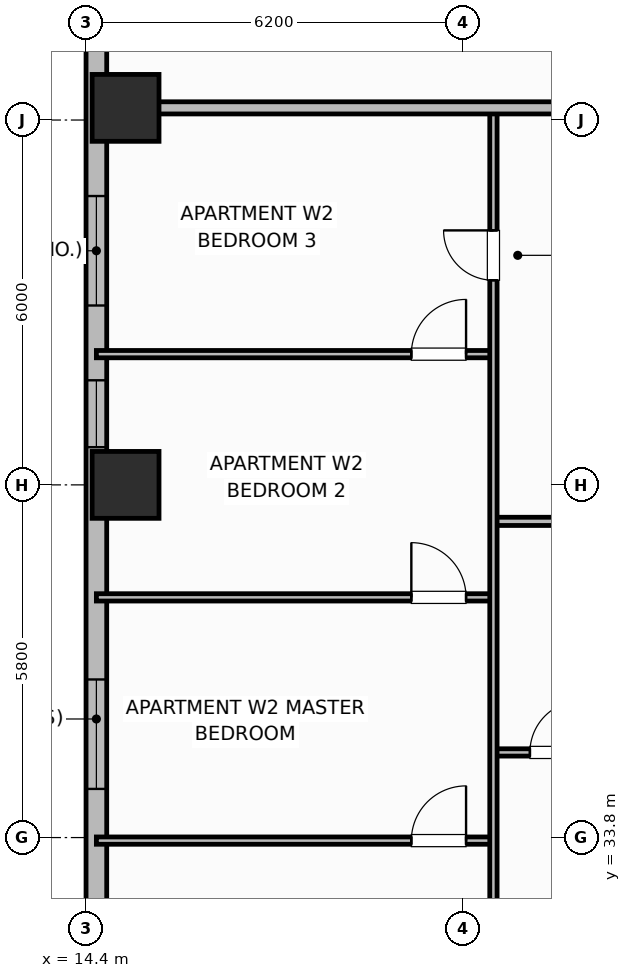
"""IFC4 building model, lengths in metres.
Left out: names, types, materials, properties, quantities, classifications, styles, units other than length and angle.
Written with IfcOpenShell. Run it as: python <this file> out.ifc"""

import sys

from ifc_helpers import new_model, si_unit, direction, frame, frame_2d, origin, origin_2d, place, context, subcontext, project, spatial, rectangle, extrude, element, fill, save


model = new_model("IFC4")
c1 = context("Model", 3, precision=1e-05, world=origin(), true_north=direction((0.0, 1.0)))
c2 = subcontext(c1, "Body", "Model", "MODEL_VIEW")
j1 = project(units=[si_unit("LENGTHUNIT", "METRE"), si_unit("PLANEANGLEUNIT", "RADIAN")], contexts=[c1])
p1 = place(None, origin())
s1 = spatial("IfcSite", under=j1, at=p1, CompositionType="ELEMENT")
p2 = place(p1, origin())
s2 = spatial("IfcBuilding", under=s1, at=p2, CompositionType="ELEMENT")
p3 = place(p2, frame((0.0, 0.0, 88.3)))
s3 = spatial("IfcBuildingStorey", under=s2, at=p3, CompositionType="ELEMENT", Elevation=88.3)
for number, where, z_axis, x_axis in (
    (1, (15.05, 39.6, 0.0), (0.0, 0.0, 1.0), (1.0, 0.0, 0.0)),
    (2, (15.05, 45.8, 0.0), (0.0, 0.0, 1.0), (1.0, 0.0, 0.0)),
):
    element("IfcColumn", number, at=place(p3, frame(where, z_axis=z_axis, x_axis=x_axis)), inside=s3, PredefinedType="COLUMN", context=c2, shape_type="SweptSolid", body=[
        extrude(rectangle(XDim=1.1, YDim=1.1, at=origin_2d()), origin(), (0.0, 0.0, 1.0), 3.7),
    ])
p4 = place(p3, frame((14.57, 47.4, 0.0), z_axis=(0.0, 0.0, 1.0), x_axis=(0.0, -1.0, 0.0)))
e3 = element("IfcWall", 3, at=p4, inside=s3, PredefinedType="SOLIDWALL", context=c2, shape_type="SweptSolid", body=[
    extrude(rectangle(XDim=14.8, YDim=0.34, at=frame_2d((7.4, 0.0))), origin(), (0.0, 0.0, 1.0), 2.7),
])
p5 = place(p4, frame((3.05, 0.0, 0.73)))
e4 = element("IfcOpeningElement", 4, at=p5, cuts=e3, PredefinedType="OPENING", context=c2, shape_type="SweptSolid", body=[
    extrude(rectangle(XDim=1.8, YDim=1.85, at=frame_2d((0.9, 0.925))), frame((0.0, 0.18, 0.0), z_axis=(0.0, -1.0, 0.0), x_axis=(1.0, 0.0, 0.0)), (0.0, 0.0, 1.0), 0.36),
])
p6 = place(p4, frame((6.08, 0.0, 0.89)))
e5 = element("IfcOpeningElement", 5, at=p6, cuts=e3, PredefinedType="OPENING", context=c2, shape_type="SweptSolid", body=[
    extrude(rectangle(XDim=1.1, YDim=1.65, at=frame_2d((0.55, 0.825))), frame((0.0, 0.18, 0.0), z_axis=(0.0, -1.0, 0.0), x_axis=(1.0, 0.0, 0.0)), (0.0, 0.0, 1.0), 0.36),
])
p7 = place(p4, frame((11.0, 0.0, 0.73)))
e6 = element("IfcOpeningElement", 6, at=p7, cuts=e3, PredefinedType="OPENING", context=c2, shape_type="SweptSolid", body=[
    extrude(rectangle(XDim=1.8, YDim=1.85, at=frame_2d((0.9, 0.925))), frame((0.0, 0.18, 0.0), z_axis=(0.0, -1.0, 0.0), x_axis=(1.0, 0.0, 0.0)), (0.0, 0.0, 1.0), 0.36),
])
p8 = place(p3, frame((21.1, 35.2, 0.0), z_axis=(0.0, 0.0, 1.0), x_axis=(1.0, 0.0, 0.0)))
e7 = element("IfcWall", 7, at=p8, inside=s3, PredefinedType="PARTITIONING", context=c2, shape_type="SweptSolid", body=[
    extrude(rectangle(XDim=2.25, YDim=0.12, at=frame_2d((1.125, 0.0))), origin(), (0.0, 0.0, 1.0), 2.53),
])
p9 = place(p8, frame((0.6, 0.0, 0.0)))
e8 = element("IfcOpeningElement", 8, at=p9, cuts=e7, PredefinedType="OPENING", context=c2, shape_type="SweptSolid", body=[
    extrude(rectangle(XDim=0.85, YDim=2.1, at=frame_2d((0.425, 1.05))), frame((0.0, 0.07, 0.0), z_axis=(0.0, -1.0, 0.0), x_axis=(1.0, 0.0, 0.0)), (0.0, 0.0, 1.0), 0.14),
])
p10 = place(p3, frame((21.1, 39.0, 0.0), z_axis=(0.0, 0.0, 1.0), x_axis=(1.0, 0.0, 0.0)))
e9 = element("IfcWall", 9, at=p10, inside=s3, PredefinedType="PARTITIONING", context=c2, shape_type="SweptSolid", body=[
    extrude(rectangle(XDim=2.25, YDim=0.135, at=frame_2d((1.125, 0.0))), origin(), (0.0, 0.0, 1.0), 2.53),
])
p11 = place(p3, frame((14.57, 33.75, 0.0), z_axis=(0.0, 0.0, 1.0), x_axis=(1.0, 0.0, 0.0)))
e10 = element("IfcWall", 10, at=p11, inside=s3, PredefinedType="PARTITIONING", context=c2, shape_type="SweptSolid", body=[
    extrude(rectangle(XDim=6.53, YDim=0.12, at=frame_2d((3.265, 0.0))), origin(), (0.0, 0.0, 1.0), 2.53),
])
p12 = place(p11, frame((5.18, 0.0, 0.0)))
e11 = element("IfcOpeningElement", 11, at=p12, cuts=e10, PredefinedType="OPENING", context=c2, shape_type="SweptSolid", body=[
    extrude(rectangle(XDim=0.9, YDim=2.1, at=frame_2d((0.45, 1.05))), frame((0.0, 0.07, 0.0), z_axis=(0.0, -1.0, 0.0), x_axis=(1.0, 0.0, 0.0)), (0.0, 0.0, 1.0), 0.14),
])
p13 = place(p3, frame((14.57, 37.75, 0.0), z_axis=(0.0, 0.0, 1.0), x_axis=(1.0, 0.0, 0.0)))
e12 = element("IfcWall", 12, at=p13, inside=s3, PredefinedType="PARTITIONING", context=c2, shape_type="SweptSolid", body=[
    extrude(rectangle(XDim=6.53, YDim=0.12, at=frame_2d((3.265, 0.0))), origin(), (0.0, 0.0, 1.0), 2.53),
])
p14 = place(p13, frame((5.18, 0.0, 0.0)))
e13 = element("IfcOpeningElement", 13, at=p14, cuts=e12, PredefinedType="OPENING", context=c2, shape_type="SweptSolid", body=[
    extrude(rectangle(XDim=0.9, YDim=2.1, at=frame_2d((0.45, 1.05))), frame((0.0, 0.07, 0.0), z_axis=(0.0, -1.0, 0.0), x_axis=(1.0, 0.0, 0.0)), (0.0, 0.0, 1.0), 0.14),
])
p15 = place(p3, frame((14.57, 41.75, 0.0), z_axis=(0.0, 0.0, 1.0), x_axis=(1.0, 0.0, 0.0)))
e14 = element("IfcWall", 14, at=p15, inside=s3, PredefinedType="PARTITIONING", context=c2, shape_type="SweptSolid", body=[
    extrude(rectangle(XDim=6.53, YDim=0.12, at=frame_2d((3.265, 0.0))), origin(), (0.0, 0.0, 1.0), 2.53),
])
p16 = place(p15, frame((5.18, 0.0, 0.0)))
e15 = element("IfcOpeningElement", 15, at=p16, cuts=e14, PredefinedType="OPENING", context=c2, shape_type="SweptSolid", body=[
    extrude(rectangle(XDim=0.9, YDim=2.1, at=frame_2d((0.45, 1.05))), frame((0.0, 0.07, 0.0), z_axis=(0.0, -1.0, 0.0), x_axis=(1.0, 0.0, 0.0)), (0.0, 0.0, 1.0), 0.14),
])
p17 = place(p3, frame((21.1, 29.84, 0.0), z_axis=(0.0, 0.0, 1.0), x_axis=(0.0, 1.0, 0.0)))
e16 = element("IfcWall", 16, at=p17, inside=s3, PredefinedType="PARTITIONING", context=c2, shape_type="SweptSolid", body=[
    extrude(rectangle(XDim=15.92, YDim=0.12, at=frame_2d((7.96, 0.0))), origin(), (0.0, 0.0, 1.0), 2.53),
])
p18 = place(p17, frame((0.41, 0.0, 0.0)))
e17 = element("IfcOpeningElement", 17, at=p18, cuts=e16, PredefinedType="OPENING", context=c2, shape_type="SweptSolid", body=[
    extrude(rectangle(XDim=0.9, YDim=2.1, at=frame_2d((0.45, 1.05))), frame((0.0, 0.07, 0.0), z_axis=(0.0, -1.0, 0.0), x_axis=(1.0, 0.0, 0.0)), (0.0, 0.0, 1.0), 0.14),
])
p19 = place(p17, frame((13.125, 0.0, 0.0)))
e18 = element("IfcOpeningElement", 18, at=p19, cuts=e16, PredefinedType="OPENING", context=c2, shape_type="SweptSolid", body=[
    extrude(rectangle(XDim=0.82, YDim=2.08, at=frame_2d((0.41, 1.04))), frame((0.0, 0.07, 0.0), z_axis=(0.0, -1.0, 0.0), x_axis=(1.0, 0.0, 0.0)), (0.0, 0.0, 1.0), 0.14),
])
p20 = place(p3, frame((14.99, 45.8, 0.0), z_axis=(0.0, 0.0, 1.0), x_axis=(1.0, 0.0, 0.0)))
e19 = element("IfcWall", 19, at=p20, inside=s3, PredefinedType="PARTITIONING", context=c2, shape_type="SweptSolid", body=[
    extrude(rectangle(XDim=8.36, YDim=0.2, at=frame_2d((4.18, 0.0))), origin(), (0.0, 0.0, 1.0), 2.53),
])
p21 = place(p5, origin())
e20 = element("IfcWindow", 20, at=p21, inside=s3, PartitioningType="SINGLE_PANEL", PredefinedType="WINDOW", context=c2, shape_type="SweptSolid", body=[
    extrude(rectangle(XDim=1.8, YDim=1.85, at=frame_2d((0.9, 0.925))), frame((0.0, 0.03, 0.0), z_axis=(0.0, -1.0, 0.0), x_axis=(1.0, 0.0, 0.0)), (0.0, 0.0, 1.0), 0.06),
])
fill(e4, e20)
p22 = place(p6, origin())
e21 = element("IfcWindow", 21, at=p22, inside=s3, PartitioningType="SINGLE_PANEL", PredefinedType="WINDOW", context=c2, shape_type="SweptSolid", body=[
    extrude(rectangle(XDim=1.1, YDim=1.65, at=frame_2d((0.55, 0.825))), frame((0.0, 0.03, 0.0), z_axis=(0.0, -1.0, 0.0), x_axis=(1.0, 0.0, 0.0)), (0.0, 0.0, 1.0), 0.06),
])
fill(e5, e21)
p23 = place(p7, origin())
e22 = element("IfcWindow", 22, at=p23, inside=s3, PartitioningType="SINGLE_PANEL", PredefinedType="WINDOW", context=c2, shape_type="SweptSolid", body=[
    extrude(rectangle(XDim=1.8, YDim=1.85, at=frame_2d((0.9, 0.925))), frame((0.0, 0.03, 0.0), z_axis=(0.0, -1.0, 0.0), x_axis=(1.0, 0.0, 0.0)), (0.0, 0.0, 1.0), 0.06),
])
fill(e6, e22)
p24 = place(p9, origin())
e23 = element("IfcDoor", 23, at=p24, inside=s3, OperationType="SINGLE_SWING_RIGHT", PredefinedType="DOOR", context=c2, shape_type="SweptSolid", body=[
    extrude(rectangle(XDim=0.85, YDim=2.1, at=frame_2d((0.425, 1.05))), frame((0.0, 0.025, 0.0), z_axis=(0.0, -1.0, 0.0), x_axis=(1.0, 0.0, 0.0)), (0.0, 0.0, 1.0), 0.05),
])
fill(e8, e23)
p25 = place(p12, origin())
e24 = element("IfcDoor", 24, at=p25, inside=s3, OperationType="SINGLE_SWING_RIGHT", PredefinedType="DOOR", context=c2, shape_type="SweptSolid", body=[
    extrude(rectangle(XDim=0.9, YDim=2.1, at=frame_2d((0.45, 1.05))), frame((0.0, 0.025, 0.0), z_axis=(0.0, -1.0, 0.0), x_axis=(1.0, 0.0, 0.0)), (0.0, 0.0, 1.0), 0.05),
])
fill(e11, e24)
p26 = place(p14, origin())
e25 = element("IfcDoor", 25, at=p26, inside=s3, OperationType="SINGLE_SWING_LEFT", PredefinedType="DOOR", context=c2, shape_type="SweptSolid", body=[
    extrude(rectangle(XDim=0.9, YDim=2.1, at=frame_2d((0.45, 1.05))), frame((0.0, 0.025, 0.0), z_axis=(0.0, -1.0, 0.0), x_axis=(1.0, 0.0, 0.0)), (0.0, 0.0, 1.0), 0.05),
])
fill(e13, e25)
p27 = place(p16, origin())
e26 = element("IfcDoor", 26, at=p27, inside=s3, OperationType="SINGLE_SWING_RIGHT", PredefinedType="DOOR", context=c2, shape_type="SweptSolid", body=[
    extrude(rectangle(XDim=0.9, YDim=2.1, at=frame_2d((0.45, 1.05))), frame((0.0, 0.025, 0.0), z_axis=(0.0, -1.0, 0.0), x_axis=(1.0, 0.0, 0.0)), (0.0, 0.0, 1.0), 0.05),
])
fill(e15, e26)
p28 = place(p19, origin())
e27 = element("IfcDoor", 27, at=p28, inside=s3, OperationType="SINGLE_SWING_RIGHT", PredefinedType="DOOR", context=c2, shape_type="SweptSolid", body=[
    extrude(rectangle(XDim=0.82, YDim=2.08, at=frame_2d((0.41, 1.04))), frame((0.0, 0.025, 0.0), z_axis=(0.0, -1.0, 0.0), x_axis=(1.0, 0.0, 0.0)), (0.0, 0.0, 1.0), 0.05),
])
fill(e18, e27)
save(model, sys.argv[1])
